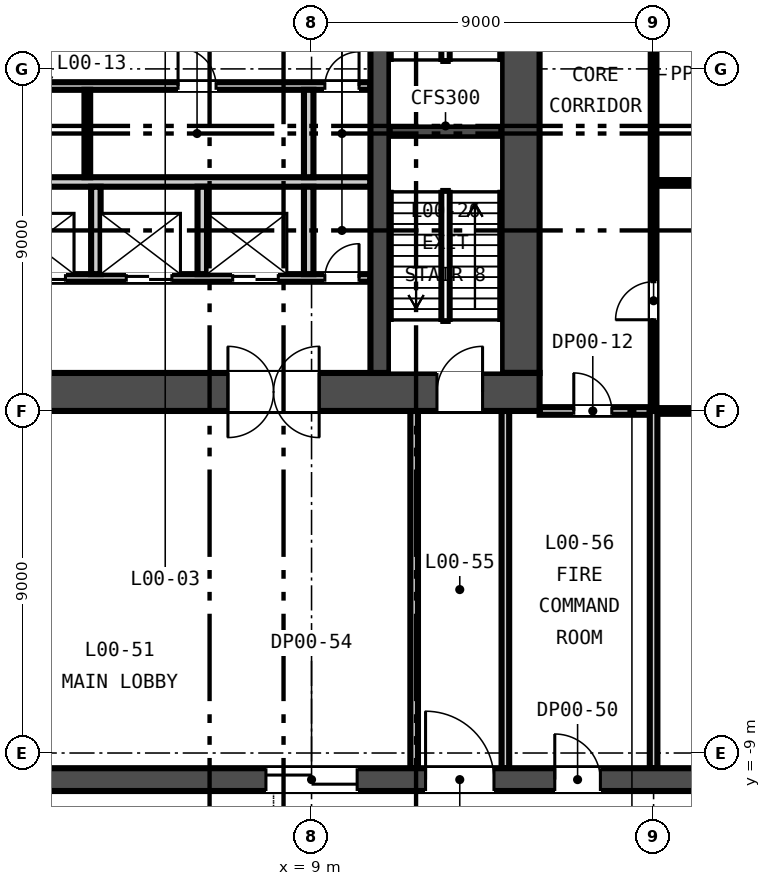
"""IFC4 building model, lengths in metres.
Left out: names, types, materials, properties, quantities, classifications, styles, units other than length and angle.
Written with IfcOpenShell. Run it as: python <this file> out.ifc"""

import sys

from ifc_helpers import new_model, si_unit, direction, frame, frame_2d, origin, place, context, subcontext, project, spatial, rectangle, extrude, element, fill, save


model = new_model("IFC4")
c1 = context("Model", 3, precision=1e-05, world=origin(), true_north=direction((0.0, 1.0)))
c2 = subcontext(c1, "Body", "Model", "MODEL_VIEW")
j1 = project(units=[si_unit("LENGTHUNIT", "METRE"), si_unit("PLANEANGLEUNIT", "RADIAN")], contexts=[c1])
p1 = place(None, origin())
s1 = spatial("IfcSite", under=j1, at=p1, CompositionType="ELEMENT")
p2 = place(p1, origin())
s2 = spatial("IfcBuilding", under=s1, at=p2, CompositionType="ELEMENT")
p3 = place(p2, origin())
s3 = spatial("IfcBuildingStorey", under=s2, at=p3, CompositionType="ELEMENT", Elevation=0.0)
p4 = place(p3, frame((-15.0, 0.5, -2.2), z_axis=(0.0, 0.0, 1.0), x_axis=(1.0, 0.0, 0.0)))
e1 = element("IfcWall", 1, at=p4, inside=s3, PredefinedType="SOLIDWALL", context=c2, shape_type="SweptSolid", body=[
    extrude(rectangle(XDim=30.0, YDim=1.0, at=frame_2d((15.0, 0.0))), origin(), (0.0, 0.0, 1.0), 10.8),
])
p5 = place(p4, frame((5.8, 0.0, 2.2)))
e2 = element("IfcOpeningElement", 2, at=p5, cuts=e1, PredefinedType="OPENING", context=c2, shape_type="SweptSolid", body=[
    extrude(rectangle(XDim=2.4, YDim=2.4, at=frame_2d((1.2, 1.2))), frame((0.0, 0.51, 0.0), z_axis=(0.0, -1.0, 0.0), x_axis=(1.0, 0.0, 0.0)), (0.0, 0.0, 1.0), 1.02),
])
p6 = place(p4, frame((13.8, 0.0, 2.2)))
e3 = element("IfcOpeningElement", 3, at=p6, cuts=e1, PredefinedType="OPENING", context=c2, shape_type="SweptSolid", body=[
    extrude(rectangle(XDim=2.4, YDim=2.4, at=frame_2d((1.2, 1.2))), frame((0.0, 0.51, 0.0), z_axis=(0.0, -1.0, 0.0), x_axis=(1.0, 0.0, 0.0)), (0.0, 0.0, 1.0), 1.02),
])
p7 = place(p4, frame((21.8, 0.0, 2.2)))
e4 = element("IfcOpeningElement", 4, at=p7, cuts=e1, PredefinedType="OPENING", context=c2, shape_type="SweptSolid", body=[
    extrude(rectangle(XDim=2.4, YDim=2.4, at=frame_2d((1.2, 1.2))), frame((0.0, 0.51, 0.0), z_axis=(0.0, -1.0, 0.0), x_axis=(1.0, 0.0, 0.0)), (0.0, 0.0, 1.0), 1.02),
])
p8 = place(p4, frame((1.5, 0.0, 2.2)))
e5 = element("IfcOpeningElement", 5, at=p8, cuts=e1, PredefinedType="OPENING", context=c2, shape_type="SweptSolid", body=[
    extrude(rectangle(XDim=1.2, YDim=2.1, at=frame_2d((0.6, 1.05))), frame((0.0, 0.51, 0.0), z_axis=(0.0, -1.0, 0.0), x_axis=(1.0, 0.0, 0.0)), (0.0, 0.0, 1.0), 1.02),
])
p9 = place(p4, frame((27.3, 0.0, 2.2)))
e6 = element("IfcOpeningElement", 6, at=p9, cuts=e1, PredefinedType="OPENING", context=c2, shape_type="SweptSolid", body=[
    extrude(rectangle(XDim=1.2, YDim=2.1, at=frame_2d((0.6, 1.05))), frame((0.0, 0.51, 0.0), z_axis=(0.0, -1.0, 0.0), x_axis=(1.0, 0.0, 0.0)), (0.0, 0.0, 1.0), 1.02),
])
p10 = place(p3, frame((14.5, 1.0, -2.2), z_axis=(0.0, 0.0, 1.0), x_axis=(0.0, 1.0, 0.0)))
e7 = element("IfcWall", 7, at=p10, inside=s3, PredefinedType="SOLIDWALL", context=c2, shape_type="SweptSolid", body=[
    extrude(rectangle(XDim=13.0, YDim=1.0, at=frame_2d((6.5, 0.0))), origin(), (0.0, 0.0, 1.0), 10.8),
])
p11 = place(p3, frame((10.8, 1.0, -2.2), z_axis=(0.0, 0.0, 1.0), x_axis=(0.0, 1.0, 0.0)))
e8 = element("IfcWall", 8, at=p11, inside=s3, PredefinedType="SOLIDWALL", context=c2, shape_type="SweptSolid", body=[
    extrude(rectangle(XDim=13.0, YDim=0.5, at=frame_2d((6.5, 0.0))), origin(), (0.0, 0.0, 1.0), 10.8),
])
p12 = place(p3, frame((-52.0, -9.7, -0.3), z_axis=(0.0, 0.0, 1.0), x_axis=(1.0, 0.0, 0.0)))
e9 = element("IfcWall", 9, at=p12, inside=s3, PredefinedType="SOLIDWALL", context=c2, shape_type="SweptSolid", body=[
    extrude(rectangle(XDim=104.0, YDim=0.6, at=frame_2d((52.0, 0.0))), origin(), (0.0, 0.0, 1.0), 8.9),
])
p13 = place(p12, frame((67.4, 0.0, 0.3)))
e10 = element("IfcOpeningElement", 10, at=p13, cuts=e9, PredefinedType="OPENING", context=c2, shape_type="SweptSolid", body=[
    extrude(rectangle(XDim=1.2, YDim=2.1, at=frame_2d((0.6, 1.05))), frame((0.0, 0.31, 0.0), z_axis=(0.0, -1.0, 0.0), x_axis=(1.0, 0.0, 0.0)), (0.0, 0.0, 1.0), 0.62),
])
p14 = place(p12, frame((38.2, 0.0, 0.3)))
e11 = element("IfcOpeningElement", 11, at=p14, cuts=e9, PredefinedType="OPENING", context=c2, shape_type="SweptSolid", body=[
    extrude(rectangle(XDim=1.8, YDim=2.4, at=frame_2d((0.9, 1.2))), frame((0.0, 0.31, 0.0), z_axis=(0.0, -1.0, 0.0), x_axis=(1.0, 0.0, 0.0)), (0.0, 0.0, 1.0), 0.62),
])
p15 = place(p12, frame((64.0, 0.0, 0.3)))
e12 = element("IfcOpeningElement", 12, at=p15, cuts=e9, PredefinedType="OPENING", context=c2, shape_type="SweptSolid", body=[
    extrude(rectangle(XDim=1.8, YDim=2.4, at=frame_2d((0.9, 1.2))), frame((0.0, 0.31, 0.0), z_axis=(0.0, -1.0, 0.0), x_axis=(1.0, 0.0, 0.0)), (0.0, 0.0, 1.0), 0.62),
])
p16 = place(p12, frame((41.8, 0.0, 0.3)))
e13 = element("IfcOpeningElement", 13, at=p16, cuts=e9, PredefinedType="OPENING", context=c2, shape_type="SweptSolid", body=[
    extrude(rectangle(XDim=2.4, YDim=2.4, at=frame_2d((1.2, 1.2))), frame((0.0, 0.31, 0.0), z_axis=(0.0, -1.0, 0.0), x_axis=(1.0, 0.0, 0.0)), (0.0, 0.0, 1.0), 0.62),
])
p17 = place(p12, frame((59.8, 0.0, 0.3)))
e14 = element("IfcOpeningElement", 14, at=p17, cuts=e9, PredefinedType="OPENING", context=c2, shape_type="SweptSolid", body=[
    extrude(rectangle(XDim=2.4, YDim=2.4, at=frame_2d((1.2, 1.2))), frame((0.0, 0.31, 0.0), z_axis=(0.0, -1.0, 0.0), x_axis=(1.0, 0.0, 0.0)), (0.0, 0.0, 1.0), 0.62),
])
p18 = place(p12, frame((22.8, 0.0, 0.3)))
e15 = element("IfcOpeningElement", 15, at=p18, cuts=e9, PredefinedType="OPENING", context=c2, shape_type="SweptSolid", body=[
    extrude(rectangle(XDim=2.4, YDim=2.4, at=frame_2d((1.2, 1.2))), frame((0.0, 0.31, 0.0), z_axis=(0.0, -1.0, 0.0), x_axis=(1.0, 0.0, 0.0)), (0.0, 0.0, 1.0), 0.62),
])
p19 = place(p12, frame((78.8, 0.0, 0.3)))
e16 = element("IfcOpeningElement", 16, at=p19, cuts=e9, PredefinedType="OPENING", context=c2, shape_type="SweptSolid", body=[
    extrude(rectangle(XDim=2.4, YDim=2.4, at=frame_2d((1.2, 1.2))), frame((0.0, 0.31, 0.0), z_axis=(0.0, -1.0, 0.0), x_axis=(1.0, 0.0, 0.0)), (0.0, 0.0, 1.0), 0.62),
])
p20 = place(p12, frame((7.1, 0.0, 0.3)))
e17 = element("IfcOpeningElement", 17, at=p20, cuts=e9, PredefinedType="OPENING", context=c2, shape_type="SweptSolid", body=[
    extrude(rectangle(XDim=1.8, YDim=2.4, at=frame_2d((0.9, 1.2))), frame((0.0, 0.31, 0.0), z_axis=(0.0, -1.0, 0.0), x_axis=(1.0, 0.0, 0.0)), (0.0, 0.0, 1.0), 0.62),
])
p21 = place(p12, frame((95.1, 0.0, 0.3)))
e18 = element("IfcOpeningElement", 18, at=p21, cuts=e9, PredefinedType="OPENING", context=c2, shape_type="SweptSolid", body=[
    extrude(rectangle(XDim=1.8, YDim=2.4, at=frame_2d((0.9, 1.2))), frame((0.0, 0.31, 0.0), z_axis=(0.0, -1.0, 0.0), x_axis=(1.0, 0.0, 0.0)), (0.0, 0.0, 1.0), 0.62),
])
p22 = place(p3, frame((-10.55, 3.5, 0.0), z_axis=(0.0, 0.0, 1.0), x_axis=(1.0, 0.0, 0.0)))
e19 = element("IfcWall", 19, at=p22, inside=s3, PredefinedType="PARTITIONING", context=c2, shape_type="SweptSolid", body=[
    extrude(rectangle(XDim=21.1, YDim=0.2, at=frame_2d((10.55, 0.0))), origin(), (0.0, 0.0, 1.0), 8.6),
])
p23 = place(p22, frame((0.675, 0.0, 0.0)))
e20 = element("IfcOpeningElement", 20, at=p23, cuts=e19, PredefinedType="OPENING", context=c2, shape_type="SweptSolid", body=[
    extrude(rectangle(XDim=1.2, YDim=2.1, at=frame_2d((0.6, 1.05))), frame((0.0, 0.11, 0.0), z_axis=(0.0, -1.0, 0.0), x_axis=(1.0, 0.0, 0.0)), (0.0, 0.0, 1.0), 0.22),
])
p24 = place(p22, frame((3.475, 0.0, 0.0)))
e21 = element("IfcOpeningElement", 21, at=p24, cuts=e19, PredefinedType="OPENING", context=c2, shape_type="SweptSolid", body=[
    extrude(rectangle(XDim=1.2, YDim=2.1, at=frame_2d((0.6, 1.05))), frame((0.0, 0.11, 0.0), z_axis=(0.0, -1.0, 0.0), x_axis=(1.0, 0.0, 0.0)), (0.0, 0.0, 1.0), 0.22),
])
p25 = place(p22, frame((6.275, 0.0, 0.0)))
e22 = element("IfcOpeningElement", 22, at=p25, cuts=e19, PredefinedType="OPENING", context=c2, shape_type="SweptSolid", body=[
    extrude(rectangle(XDim=1.2, YDim=2.1, at=frame_2d((0.6, 1.05))), frame((0.0, 0.11, 0.0), z_axis=(0.0, -1.0, 0.0), x_axis=(1.0, 0.0, 0.0)), (0.0, 0.0, 1.0), 0.22),
])
p26 = place(p22, frame((9.075, 0.0, 0.0)))
e23 = element("IfcOpeningElement", 23, at=p26, cuts=e19, PredefinedType="OPENING", context=c2, shape_type="SweptSolid", body=[
    extrude(rectangle(XDim=1.2, YDim=2.1, at=frame_2d((0.6, 1.05))), frame((0.0, 0.11, 0.0), z_axis=(0.0, -1.0, 0.0), x_axis=(1.0, 0.0, 0.0)), (0.0, 0.0, 1.0), 0.22),
])
p27 = place(p22, frame((11.875, 0.0, 0.0)))
e24 = element("IfcOpeningElement", 24, at=p27, cuts=e19, PredefinedType="OPENING", context=c2, shape_type="SweptSolid", body=[
    extrude(rectangle(XDim=1.2, YDim=2.1, at=frame_2d((0.6, 1.05))), frame((0.0, 0.11, 0.0), z_axis=(0.0, -1.0, 0.0), x_axis=(1.0, 0.0, 0.0)), (0.0, 0.0, 1.0), 0.22),
])
p28 = place(p22, frame((14.675, 0.0, 0.0)))
e25 = element("IfcOpeningElement", 25, at=p28, cuts=e19, PredefinedType="OPENING", context=c2, shape_type="SweptSolid", body=[
    extrude(rectangle(XDim=1.2, YDim=2.1, at=frame_2d((0.6, 1.05))), frame((0.0, 0.11, 0.0), z_axis=(0.0, -1.0, 0.0), x_axis=(1.0, 0.0, 0.0)), (0.0, 0.0, 1.0), 0.22),
])
p29 = place(p22, frame((17.475, 0.0, 0.0)))
e26 = element("IfcOpeningElement", 26, at=p29, cuts=e19, PredefinedType="OPENING", context=c2, shape_type="SweptSolid", body=[
    extrude(rectangle(XDim=1.2, YDim=2.1, at=frame_2d((0.6, 1.05))), frame((0.0, 0.11, 0.0), z_axis=(0.0, -1.0, 0.0), x_axis=(1.0, 0.0, 0.0)), (0.0, 0.0, 1.0), 0.22),
])
p30 = place(p22, frame((19.9, 0.0, 0.0)))
e27 = element("IfcOpeningElement", 27, at=p30, cuts=e19, PredefinedType="OPENING", context=c2, shape_type="SweptSolid", body=[
    extrude(rectangle(XDim=0.9, YDim=2.1, at=frame_2d((0.45, 1.05))), frame((0.0, 0.11, 0.0), z_axis=(0.0, -1.0, 0.0), x_axis=(1.0, 0.0, 0.0)), (0.0, 0.0, 1.0), 0.22),
])
p31 = place(p3, frame((-10.55, 6.025, 0.0), z_axis=(0.0, 0.0, 1.0), x_axis=(1.0, 0.0, 0.0)))
e28 = element("IfcWall", 28, at=p31, inside=s3, PredefinedType="PARTITIONING", context=c2, shape_type="SweptSolid", body=[
    extrude(rectangle(XDim=21.1, YDim=0.25, at=frame_2d((10.55, 0.0))), origin(), (0.0, 0.0, 1.0), 8.6),
])
p32 = place(p3, frame((-4.125, 8.55, 0.0), z_axis=(0.0, 0.0, 1.0), x_axis=(1.0, 0.0, 0.0)))
e29 = element("IfcWall", 29, at=p32, inside=s3, PredefinedType="PARTITIONING", context=c2, shape_type="SweptSolid", body=[
    extrude(rectangle(XDim=14.675, YDim=0.2, at=frame_2d((7.337, 0.0))), origin(), (0.0, 0.0, 1.0), 8.6),
])
p33 = place(p32, frame((1.413, 0.0, 0.0)))
e30 = element("IfcOpeningElement", 30, at=p33, cuts=e29, PredefinedType="OPENING", context=c2, shape_type="SweptSolid", body=[
    extrude(rectangle(XDim=1.0, YDim=2.1, at=frame_2d((0.5, 1.05))), frame((0.0, 0.11, 0.0), z_axis=(0.0, -1.0, 0.0), x_axis=(1.0, 0.0, 0.0)), (0.0, 0.0, 1.0), 0.22),
])
p34 = place(p32, frame((5.0, 0.0, 0.0)))
e31 = element("IfcOpeningElement", 31, at=p34, cuts=e29, PredefinedType="OPENING", context=c2, shape_type="SweptSolid", body=[
    extrude(rectangle(XDim=1.0, YDim=2.1, at=frame_2d((0.5, 1.05))), frame((0.0, 0.11, 0.0), z_axis=(0.0, -1.0, 0.0), x_axis=(1.0, 0.0, 0.0)), (0.0, 0.0, 1.0), 0.22),
])
p35 = place(p32, frame((9.613, 0.0, 0.0)))
e32 = element("IfcOpeningElement", 32, at=p35, cuts=e29, PredefinedType="OPENING", context=c2, shape_type="SweptSolid", body=[
    extrude(rectangle(XDim=1.0, YDim=2.1, at=frame_2d((0.5, 1.05))), frame((0.0, 0.11, 0.0), z_axis=(0.0, -1.0, 0.0), x_axis=(1.0, 0.0, 0.0)), (0.0, 0.0, 1.0), 0.22),
])
p36 = place(p32, frame((13.475, 0.0, 0.0)))
e33 = element("IfcOpeningElement", 33, at=p36, cuts=e29, PredefinedType="OPENING", context=c2, shape_type="SweptSolid", body=[
    extrude(rectangle(XDim=0.9, YDim=2.1, at=frame_2d((0.45, 1.05))), frame((0.0, 0.11, 0.0), z_axis=(0.0, -1.0, 0.0), x_axis=(1.0, 0.0, 0.0)), (0.0, 0.0, 1.0), 0.22),
])
for number, where, z_axis, x_axis in (
    (34, (3.325, 3.6, 0.0), (0.0, 0.0, 1.0), (0.0, 1.0, 0.0)),
    (35, (6.125, 3.6, 0.0), (0.0, 0.0, 1.0), (0.0, 1.0, 0.0)),
    (36, (8.925, 3.6, 0.0), (0.0, 0.0, 1.0), (0.0, 1.0, 0.0)),
):
    element("IfcWall", number, at=place(p3, frame(where, z_axis=z_axis, x_axis=x_axis)), inside=s3, PredefinedType="PARTITIONING", context=c2, shape_type="SweptSolid", body=[
        extrude(rectangle(XDim=2.3, YDim=0.25, at=frame_2d((1.15, 0.0))), origin(), (0.0, 0.0, 1.0), 8.6),
    ])
p37 = place(p3, frame((3.1, 6.15, 0.0), z_axis=(0.0, 0.0, 1.0), x_axis=(0.0, 1.0, 0.0)))
e37 = element("IfcWall", 37, at=p37, inside=s3, PredefinedType="PARTITIONING", context=c2, shape_type="SweptSolid", body=[
    extrude(rectangle(XDim=2.3, YDim=0.15, at=frame_2d((1.15, 0.0))), origin(), (0.0, 0.0, 1.0), 8.6),
])
p38 = place(p3, frame((8.925, 6.15, 0.0), z_axis=(0.0, 0.0, 1.0), x_axis=(0.0, 1.0, 0.0)))
e38 = element("IfcWall", 38, at=p38, inside=s3, PredefinedType="PARTITIONING", context=c2, shape_type="SweptSolid", body=[
    extrude(rectangle(XDim=2.3, YDim=0.25, at=frame_2d((1.15, 0.0))), origin(), (0.0, 0.0, 1.0), 8.6),
])
p39 = place(p3, frame((11.05, 7.35, 0.0), z_axis=(0.0, 0.0, 1.0), x_axis=(1.0, 0.0, 0.0)))
e39 = element("IfcWall", 39, at=p39, inside=s3, PredefinedType="SOLIDWALL", context=c2, shape_type="SweptSolid", body=[
    extrude(rectangle(XDim=2.95, YDim=0.3, at=frame_2d((1.475, 0.0))), origin(), (0.0, 0.0, 1.0), 8.6),
])
p40 = place(p3, frame((15.0, 0.0, 0.0), z_axis=(0.0, 0.0, 1.0), x_axis=(1.0, 0.0, 0.0)))
e40 = element("IfcWall", 40, at=p40, inside=s3, PredefinedType="PARTITIONING", context=c2, shape_type="SweptSolid", body=[
    extrude(rectangle(XDim=2.9, YDim=0.2, at=frame_2d((1.45, 0.0))), origin(), (0.0, 0.0, 1.0), 8.6),
])
p41 = place(p40, frame((0.9, 0.0, 0.0)))
e41 = element("IfcOpeningElement", 41, at=p41, cuts=e40, PredefinedType="OPENING", context=c2, shape_type="SweptSolid", body=[
    extrude(rectangle(XDim=1.0, YDim=2.1, at=frame_2d((0.5, 1.05))), frame((0.0, 0.11, 0.0), z_axis=(0.0, -1.0, 0.0), x_axis=(1.0, 0.0, 0.0)), (0.0, 0.0, 1.0), 0.22),
])
p42 = place(p3, frame((18.1, 0.0, 0.0), z_axis=(0.0, 0.0, 1.0), x_axis=(1.0, 0.0, 0.0)))
e42 = element("IfcWall", 42, at=p42, inside=s3, PredefinedType="PARTITIONING", context=c2, shape_type="SweptSolid", body=[
    extrude(rectangle(XDim=12.75, YDim=0.15, at=frame_2d((6.375, 0.0))), origin(), (0.0, 0.0, 1.0), 8.6),
])
p43 = place(p42, frame((6.05, 0.0, 0.0)))
e43 = element("IfcOpeningElement", 43, at=p43, cuts=e42, PredefinedType="OPENING", context=c2, shape_type="SweptSolid", body=[
    extrude(rectangle(XDim=1.0, YDim=2.1, at=frame_2d((0.5, 1.05))), frame((0.0, 0.085, 0.0), z_axis=(0.0, -1.0, 0.0), x_axis=(1.0, 0.0, 0.0)), (0.0, 0.0, 1.0), 0.17),
])
p44 = place(p42, frame((9.8, 0.0, 0.0)))
e44 = element("IfcOpeningElement", 44, at=p44, cuts=e42, PredefinedType="OPENING", context=c2, shape_type="SweptSolid", body=[
    extrude(rectangle(XDim=1.0, YDim=2.1, at=frame_2d((0.5, 1.05))), frame((0.0, 0.085, 0.0), z_axis=(0.0, -1.0, 0.0), x_axis=(1.0, 0.0, 0.0)), (0.0, 0.0, 1.0), 0.17),
])
p45 = place(p3, frame((18.075, 6.0, 0.0), z_axis=(0.0, 0.0, 1.0), x_axis=(1.0, 0.0, 0.0)))
e45 = element("IfcWall", 45, at=p45, inside=s3, PredefinedType="PARTITIONING", context=c2, shape_type="SweptSolid", body=[
    extrude(rectangle(XDim=5.863, YDim=0.15, at=frame_2d((2.931, 0.0))), origin(), (0.0, 0.0, 1.0), 8.6),
])
for number, where, z_axis, x_axis in (
    (46, (11.7, -9.4, 0.0), (0.0, 0.0, 1.0), (0.0, 1.0, 0.0)),
    (47, (14.1, -9.4, 0.0), (0.0, 0.0, 1.0), (0.0, 1.0, 0.0)),
    (48, (18.0, -9.4, 0.0), (0.0, 0.0, 1.0), (0.0, 1.0, 0.0)),
):
    element("IfcWall", number, at=place(p3, frame(where, z_axis=z_axis, x_axis=x_axis)), inside=s3, PredefinedType="PARTITIONING", context=c2, shape_type="SweptSolid", body=[
        extrude(rectangle(XDim=9.4, YDim=0.2, at=frame_2d((4.7, 0.0))), origin(), (0.0, 0.0, 1.0), 8.6),
    ])
p46 = place(p3, frame((18.0, 0.0, 0.0), z_axis=(0.0, 0.0, 1.0), x_axis=(0.0, 1.0, 0.0)))
e49 = element("IfcWall", 49, at=p46, inside=s3, PredefinedType="PARTITIONING", context=c2, shape_type="SweptSolid", body=[
    extrude(rectangle(XDim=14.25, YDim=0.15, at=frame_2d((7.125, 0.0))), origin(), (0.0, 0.0, 1.0), 8.6),
])
p47 = place(p46, frame((2.4, 0.0, 0.0)))
e50 = element("IfcOpeningElement", 50, at=p47, cuts=e49, PredefinedType="OPENING", context=c2, shape_type="SweptSolid", body=[
    extrude(rectangle(XDim=1.0, YDim=2.1, at=frame_2d((0.5, 1.05))), frame((0.0, 0.085, 0.0), z_axis=(0.0, -1.0, 0.0), x_axis=(1.0, 0.0, 0.0)), (0.0, 0.0, 1.0), 0.17),
])
p48 = place(p27, origin())
e51 = element("IfcDoor", 51, at=p48, inside=s3, OperationType="DOUBLE_DOOR_SLIDING", PredefinedType="DOOR", context=c2, shape_type="SweptSolid", body=[
    extrude(rectangle(XDim=1.2, YDim=2.1, at=frame_2d((0.6, 1.05))), frame((0.0, 0.025, 0.0), z_axis=(0.0, -1.0, 0.0), x_axis=(1.0, 0.0, 0.0)), (0.0, 0.0, 1.0), 0.05),
])
fill(e24, e51)
p49 = place(p28, origin())
e52 = element("IfcDoor", 52, at=p49, inside=s3, OperationType="DOUBLE_DOOR_SLIDING", PredefinedType="DOOR", context=c2, shape_type="SweptSolid", body=[
    extrude(rectangle(XDim=1.2, YDim=2.1, at=frame_2d((0.6, 1.05))), frame((0.0, 0.025, 0.0), z_axis=(0.0, -1.0, 0.0), x_axis=(1.0, 0.0, 0.0)), (0.0, 0.0, 1.0), 0.05),
])
fill(e25, e52)
p50 = place(p29, origin())
e53 = element("IfcDoor", 53, at=p50, inside=s3, OperationType="DOUBLE_DOOR_SLIDING", PredefinedType="DOOR", context=c2, shape_type="SweptSolid", body=[
    extrude(rectangle(XDim=1.2, YDim=2.1, at=frame_2d((0.6, 1.05))), frame((0.0, 0.025, 0.0), z_axis=(0.0, -1.0, 0.0), x_axis=(1.0, 0.0, 0.0)), (0.0, 0.0, 1.0), 0.05),
])
fill(e26, e53)
p51 = place(p30, origin())
e54 = element("IfcDoor", 54, at=p51, inside=s3, OperationType="SINGLE_SWING_RIGHT", PredefinedType="DOOR", context=c2, shape_type="SweptSolid", body=[
    extrude(rectangle(XDim=0.9, YDim=2.1, at=frame_2d((0.45, 1.05))), frame((0.0, 0.025, 0.0), z_axis=(0.0, -1.0, 0.0), x_axis=(1.0, 0.0, 0.0)), (0.0, 0.0, 1.0), 0.05),
])
fill(e27, e54)
p52 = place(p35, origin())
e55 = element("IfcDoor", 55, at=p52, inside=s3, OperationType="SINGLE_SWING_LEFT", PredefinedType="DOOR", context=c2, shape_type="SweptSolid", body=[
    extrude(rectangle(XDim=1.0, YDim=2.1, at=frame_2d((0.5, 1.05))), frame((0.0, 0.025, 0.0), z_axis=(0.0, -1.0, 0.0), x_axis=(1.0, 0.0, 0.0)), (0.0, 0.0, 1.0), 0.05),
])
fill(e32, e55)
p53 = place(p36, origin())
e56 = element("IfcDoor", 56, at=p53, inside=s3, OperationType="SINGLE_SWING_RIGHT", PredefinedType="DOOR", context=c2, shape_type="SweptSolid", body=[
    extrude(rectangle(XDim=0.9, YDim=2.1, at=frame_2d((0.45, 1.05))), frame((0.0, 0.025, 0.0), z_axis=(0.0, -1.0, 0.0), x_axis=(1.0, 0.0, 0.0)), (0.0, 0.0, 1.0), 0.05),
])
fill(e33, e56)
p54 = place(p7, origin())
e57 = element("IfcDoor", 57, at=p54, inside=s3, OperationType="DOUBLE_DOOR_DOUBLE_SWING", PredefinedType="DOOR", context=c2, shape_type="SweptSolid", body=[
    extrude(rectangle(XDim=2.4, YDim=2.4, at=frame_2d((1.2, 1.2))), frame((0.0, 0.025, 0.0), z_axis=(0.0, -1.0, 0.0), x_axis=(1.0, 0.0, 0.0)), (0.0, 0.0, 1.0), 0.05),
])
fill(e4, e57)
p55 = place(p9, origin())
e58 = element("IfcDoor", 58, at=p55, inside=s3, OperationType="SINGLE_SWING_RIGHT", PredefinedType="DOOR", context=c2, shape_type="SweptSolid", body=[
    extrude(rectangle(XDim=1.2, YDim=2.1, at=frame_2d((0.6, 1.05))), frame((0.0, 0.025, 0.0), z_axis=(0.0, -1.0, 0.0), x_axis=(1.0, 0.0, 0.0)), (0.0, 0.0, 1.0), 0.05),
])
fill(e6, e58)
p56 = place(p41, origin())
e59 = element("IfcDoor", 59, at=p56, inside=s3, OperationType="SINGLE_SWING_LEFT", PredefinedType="DOOR", context=c2, shape_type="SweptSolid", body=[
    extrude(rectangle(XDim=1.0, YDim=2.1, at=frame_2d((0.5, 1.05))), frame((0.0, 0.025, 0.0), z_axis=(0.0, -1.0, 0.0), x_axis=(1.0, 0.0, 0.0)), (0.0, 0.0, 1.0), 0.05),
])
fill(e41, e59)
p57 = place(p47, origin())
e60 = element("IfcDoor", 60, at=p57, inside=s3, OperationType="SINGLE_SWING_LEFT", PredefinedType="DOOR", context=c2, shape_type="SweptSolid", body=[
    extrude(rectangle(XDim=1.0, YDim=2.1, at=frame_2d((0.5, 1.05))), frame((0.0, 0.025, 0.0), z_axis=(0.0, -1.0, 0.0), x_axis=(1.0, 0.0, 0.0)), (0.0, 0.0, 1.0), 0.05),
])
fill(e50, e60)
p58 = place(p13, frame((1.2, 0.0, 0.0), z_axis=(0.0, 0.0, 1.0), x_axis=(-1.0, 0.0, 0.0)))
e61 = element("IfcDoor", 61, at=p58, inside=s3, OperationType="SINGLE_SWING_LEFT", PredefinedType="DOOR", context=c2, shape_type="SweptSolid", body=[
    extrude(rectangle(XDim=1.2, YDim=2.1, at=frame_2d((0.6, 1.05))), frame((0.0, 0.025, 0.0), z_axis=(0.0, -1.0, 0.0), x_axis=(1.0, 0.0, 0.0)), (0.0, 0.0, 1.0), 0.05),
])
fill(e10, e61)
p59 = place(p15, frame((1.8, 0.0, 0.0), z_axis=(0.0, 0.0, 1.0), x_axis=(-1.0, 0.0, 0.0)))
e62 = element("IfcDoor", 62, at=p59, inside=s3, OperationType="SINGLE_SWING_LEFT", PredefinedType="DOOR", context=c2, shape_type="SweptSolid", body=[
    extrude(rectangle(XDim=1.8, YDim=2.4, at=frame_2d((0.9, 1.2))), frame((0.0, 0.025, 0.0), z_axis=(0.0, -1.0, 0.0), x_axis=(1.0, 0.0, 0.0)), (0.0, 0.0, 1.0), 0.05),
])
fill(e12, e62)
p60 = place(p17, frame((2.4, 0.0, 0.0), z_axis=(0.0, 0.0, 1.0), x_axis=(-1.0, 0.0, 0.0)))
e63 = element("IfcDoor", 63, at=p60, inside=s3, OperationType="SINGLE_SWING_LEFT", PredefinedType="DOOR", context=c2, shape_type="SweptSolid", body=[
    extrude(rectangle(XDim=2.4, YDim=2.4, at=frame_2d((1.2, 1.2))), frame((0.0, 0.025, 0.0), z_axis=(0.0, -1.0, 0.0), x_axis=(1.0, 0.0, 0.0)), (0.0, 0.0, 1.0), 0.05),
])
fill(e14, e63)
save(model, sys.argv[1])
